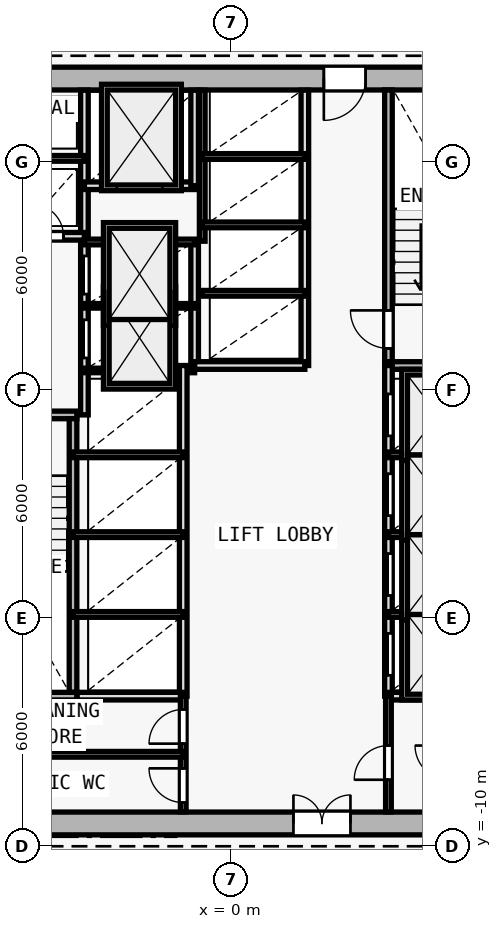
"""IFC4 building model, lengths in metres.
Left out: names, types, materials, properties, quantities, classifications, styles, units other than length and angle.
Written with IfcOpenShell. Run it as: python <this file> out.ifc"""

import sys

from ifc_helpers import new_model, si_unit, direction, frame, frame_2d, origin, origin_2d, place, context, subcontext, project, spatial, rectangle, i_section, extrude, element, fill, save


model = new_model("IFC4")
c1 = context("Model", 3, precision=1e-05, world=origin(), true_north=direction((0.0, 1.0)))
c2 = subcontext(c1, "Body", "Model", "MODEL_VIEW")
j1 = project(units=[si_unit("LENGTHUNIT", "METRE"), si_unit("PLANEANGLEUNIT", "RADIAN")], contexts=[c1])
p1 = place(None, origin())
s1 = spatial("IfcSite", under=j1, at=p1, CompositionType="ELEMENT")
p2 = place(p1, origin())
s2 = spatial("IfcBuilding", under=s1, at=p2, CompositionType="ELEMENT")
p3 = place(p2, frame((0.0, 0.0, 44.4)))
s3 = spatial("IfcBuildingStorey", under=s2, at=p3, CompositionType="ELEMENT", Elevation=44.4)
p4 = place(p3, frame((0.0, -9.4, 0.0), z_axis=(0.0, 0.0, 1.0), x_axis=(1.0, 0.0, 0.0)))
e1 = element("IfcColumn", 1, at=p4, inside=s3, PredefinedType="COLUMN", context=c2, shape_type="SweptSolid", body=[
    extrude(i_section(OverallWidth=0.416, OverallDepth=0.446, WebThickness=0.025, FlangeThickness=0.04, FilletRadius=0.015, at=origin_2d()), origin(), (0.0, 0.0, 1.0), 3.6),
])
p5 = place(p3, frame((-8.0, -9.4, 0.0), z_axis=(0.0, 0.0, 1.0), x_axis=(1.0, 0.0, 0.0)))
e2 = element("IfcWall", 2, at=p5, inside=s3, PredefinedType="SHEAR", context=c2, shape_type="SweptSolid", body=[
    extrude(rectangle(XDim=16.0, YDim=0.6, at=frame_2d((8.0, 0.0))), origin(), (0.0, 0.0, 1.0), 3.35),
])
p6 = place(p5, frame((9.65, 0.0, 0.0)))
e3 = element("IfcOpeningElement", 3, at=p6, cuts=e2, PredefinedType="OPENING", context=c2, shape_type="SweptSolid", body=[
    extrude(rectangle(XDim=1.5, YDim=2.2, at=frame_2d((0.75, 1.1))), frame((0.0, 0.31, 0.0), z_axis=(0.0, -1.0, 0.0), x_axis=(1.0, 0.0, 0.0)), (0.0, 0.0, 1.0), 0.62),
])
p7 = place(p3, frame((8.0, 10.2, 0.0), z_axis=(0.0, 0.0, 1.0), x_axis=(-1.0, 0.0, 0.0)))
e4 = element("IfcWall", 4, at=p7, inside=s3, PredefinedType="SHEAR", context=c2, shape_type="SweptSolid", body=[
    extrude(rectangle(XDim=16.0, YDim=0.6, at=frame_2d((8.0, 0.0))), origin(), (0.0, 0.0, 1.0), 3.35),
])
p8 = place(p7, frame((4.45, 0.0, 0.0)))
e5 = element("IfcOpeningElement", 5, at=p8, cuts=e4, PredefinedType="OPENING", context=c2, shape_type="SweptSolid", body=[
    extrude(rectangle(XDim=1.1, YDim=2.15, at=frame_2d((0.55, 1.075))), frame((0.0, 0.31, 0.0), z_axis=(0.0, -1.0, 0.0), x_axis=(1.0, 0.0, 0.0)), (0.0, 0.0, 1.0), 0.62),
])
p9 = place(p3, frame((-7.4, 1.35, 0.0), z_axis=(0.0, 0.0, 1.0), x_axis=(1.0, 0.0, 0.0)))
e6 = element("IfcWall", 6, at=p9, inside=s3, PredefinedType="SOLIDWALL", context=c2, shape_type="SweptSolid", body=[
    extrude(rectangle(XDim=3.35, YDim=0.2, at=frame_2d((1.675, 0.0))), origin(), (0.0, 0.0, 1.0), 3.35),
])
p10 = place(p9, frame((0.65, 0.0, 0.0)))
e7 = element("IfcOpeningElement", 7, at=p10, cuts=e6, PredefinedType="OPENING", context=c2, shape_type="SweptSolid", body=[
    extrude(rectangle(XDim=1.0, YDim=2.15, at=frame_2d((0.5, 1.075))), frame((0.0, 0.11, 0.0), z_axis=(0.0, -1.0, 0.0), x_axis=(1.0, 0.0, 0.0)), (0.0, 0.0, 1.0), 0.22),
])
p11 = place(p3, frame((-4.15, -5.95, 0.0), z_axis=(0.0, 0.0, 1.0), x_axis=(0.0, 1.0, 0.0)))
e8 = element("IfcWall", 8, at=p11, inside=s3, PredefinedType="SOLIDWALL", context=c2, shape_type="SweptSolid", body=[
    extrude(rectangle(XDim=7.2, YDim=0.2, at=frame_2d((3.6, 0.0))), origin(), (0.0, 0.0, 1.0), 3.35),
])
p12 = place(p3, frame((-3.85, 1.35, 0.0), z_axis=(0.0, 0.0, 1.0), x_axis=(0.0, 1.0, 0.0)))
e9 = element("IfcWall", 9, at=p12, inside=s3, PredefinedType="SOLIDWALL", context=c2, shape_type="SweptSolid", body=[
    extrude(rectangle(XDim=8.545, YDim=0.2, at=frame_2d((4.272, 0.0))), origin(), (0.0, 0.0, 1.0), 3.35),
])
p13 = place(p12, frame((1.5, 0.0, 0.0)))
e10 = element("IfcOpeningElement", 10, at=p13, cuts=e9, PredefinedType="OPENING", context=c2, shape_type="SweptSolid", body=[
    extrude(rectangle(XDim=1.0, YDim=2.15, at=frame_2d((0.5, 1.075))), frame((0.0, 0.11, 0.0), z_axis=(0.0, -1.0, 0.0), x_axis=(1.0, 0.0, 0.0)), (0.0, 0.0, 1.0), 0.22),
])
p14 = place(p12, frame((3.18, 0.0, 0.0)))
e11 = element("IfcOpeningElement", 11, at=p14, cuts=e9, PredefinedType="OPENING", context=c2, shape_type="SweptSolid", body=[
    extrude(rectangle(XDim=1.0, YDim=2.15, at=frame_2d((0.5, 1.075))), frame((0.0, 0.11, 0.0), z_axis=(0.0, -1.0, 0.0), x_axis=(1.0, 0.0, 0.0)), (0.0, 0.0, 1.0), 0.22),
])
p15 = place(p3, frame((-7.395, 6.05, 0.0), z_axis=(0.0, 0.0, 1.0), x_axis=(1.0, 0.0, 0.0)))
e12 = element("IfcWall", 12, at=p15, inside=s3, PredefinedType="SOLIDWALL", context=c2, shape_type="SweptSolid", body=[
    extrude(rectangle(XDim=3.545, YDim=0.2, at=frame_2d((1.772, 0.0))), origin(), (0.0, 0.0, 1.0), 3.35),
])
p16 = place(p15, frame((0.345, 0.0, 0.0)))
e13 = element("IfcOpeningElement", 13, at=p16, cuts=e12, PredefinedType="OPENING", context=c2, shape_type="SweptSolid", body=[
    extrude(rectangle(XDim=0.85, YDim=2.1, at=frame_2d((0.425, 1.05))), frame((0.0, 0.11, 0.0), z_axis=(0.0, -1.0, 0.0), x_axis=(1.0, 0.0, 0.0)), (0.0, 0.0, 1.0), 0.22),
])
p17 = place(p15, frame((2.145, 0.0, 0.0)))
e14 = element("IfcOpeningElement", 14, at=p17, cuts=e12, PredefinedType="OPENING", context=c2, shape_type="SweptSolid", body=[
    extrude(rectangle(XDim=0.85, YDim=2.1, at=frame_2d((0.425, 1.05))), frame((0.0, 0.11, 0.0), z_axis=(0.0, -1.0, 0.0), x_axis=(1.0, 0.0, 0.0)), (0.0, 0.0, 1.0), 0.22),
])
p18 = place(p3, frame((-7.395, 8.1, 0.0), z_axis=(0.0, 0.0, 1.0), x_axis=(1.0, 0.0, 0.0)))
e15 = element("IfcWall", 15, at=p18, inside=s3, PredefinedType="PARTITIONING", context=c2, shape_type="SweptSolid", body=[
    extrude(rectangle(XDim=3.545, YDim=0.15, at=frame_2d((1.772, 0.0))), origin(), (0.0, 0.0, 1.0), 3.35),
])
p19 = place(p3, frame((4.15, 2.75, 0.0), z_axis=(0.0, 0.0, 1.0), x_axis=(0.0, 1.0, 0.0)))
e16 = element("IfcWall", 16, at=p19, inside=s3, PredefinedType="SOLIDWALL", context=c2, shape_type="SweptSolid", body=[
    extrude(rectangle(XDim=7.15, YDim=0.2, at=frame_2d((3.575, 0.0))), origin(), (0.0, 0.0, 1.0), 3.35),
])
p20 = place(p19, frame((0.35, 0.0, 0.0)))
e17 = element("IfcOpeningElement", 17, at=p20, cuts=e16, PredefinedType="OPENING", context=c2, shape_type="SweptSolid", body=[
    extrude(rectangle(XDim=1.0, YDim=2.15, at=frame_2d((0.5, 1.075))), frame((0.0, 0.11, 0.0), z_axis=(0.0, -1.0, 0.0), x_axis=(1.0, 0.0, 0.0)), (0.0, 0.0, 1.0), 0.22),
])
p21 = place(p3, frame((4.05, 2.65, 0.0), z_axis=(0.0, 0.0, 1.0), x_axis=(1.0, 0.0, 0.0)))
e18 = element("IfcWall", 18, at=p21, inside=s3, PredefinedType="SOLIDWALL", context=c2, shape_type="SweptSolid", body=[
    extrude(rectangle(XDim=3.35, YDim=0.2, at=frame_2d((1.675, 0.0))), origin(), (0.0, 0.0, 1.0), 3.35),
])
p22 = place(p3, frame((-0.95, 2.65, 0.0), z_axis=(0.0, 0.0, 1.0), x_axis=(0.0, 1.0, 0.0)))
e19 = element("IfcWall", 19, at=p22, inside=s3, PredefinedType="SOLIDWALL", context=c2, shape_type="SweptSolid", body=[
    extrude(rectangle(XDim=3.27, YDim=0.2, at=frame_2d((1.635, 0.0))), origin(), (0.0, 0.0, 1.0), 3.35),
])
for number, where, z_axis, x_axis in (
    (20, (-3.85, 2.52, 0.0), (0.0, 0.0, 1.0), (1.0, 0.0, 0.0)),
    (21, (-3.85, 4.22, 0.0), (0.0, 0.0, 1.0), (1.0, 0.0, 0.0)),
):
    element("IfcWall", number, at=place(p3, frame(where, z_axis=z_axis, x_axis=x_axis)), inside=s3, PredefinedType="PARTITIONING", context=c2, shape_type="SweptSolid", body=[
        extrude(rectangle(XDim=2.9, YDim=0.12, at=frame_2d((1.45, 0.0))), origin(), (0.0, 0.0, 1.0), 3.35),
    ])
p23 = place(p3, frame((-3.85, 5.9, 0.0), z_axis=(0.0, 0.0, 1.0), x_axis=(1.0, 0.0, 0.0)))
e22 = element("IfcWall", 22, at=p23, inside=s3, PredefinedType="PARTITIONING", context=c2, shape_type="SweptSolid", body=[
    extrude(rectangle(XDim=2.9, YDim=0.15, at=frame_2d((1.45, 0.0))), origin(), (0.0, 0.0, 1.0), 3.35),
])
p24 = place(p3, frame((-3.85, 7.38, 0.0), z_axis=(0.0, 0.0, 1.0), x_axis=(1.0, 0.0, 0.0)))
e23 = element("IfcWall", 23, at=p24, inside=s3, PredefinedType="SOLIDWALL", context=c2, shape_type="SweptSolid", body=[
    extrude(rectangle(XDim=2.9, YDim=0.2, at=frame_2d((1.45, 0.0))), origin(), (0.0, 0.0, 1.0), 3.35),
])
p25 = place(p24, frame((0.85, 0.0, 0.0)))
e24 = element("IfcOpeningElement", 24, at=p25, cuts=e23, PredefinedType="OPENING", context=c2, shape_type="SweptSolid", body=[
    extrude(rectangle(XDim=1.2, YDim=2.2, at=frame_2d((0.6, 1.1))), frame((0.0, 0.11, 0.0), z_axis=(0.0, -1.0, 0.0), x_axis=(1.0, 0.0, 0.0)), (0.0, 0.0, 1.0), 0.22),
])
p26 = place(p3, frame((-0.95, 7.38, 0.0), z_axis=(0.0, 0.0, 1.0), x_axis=(0.0, 1.0, 0.0)))
e25 = element("IfcWall", 25, at=p26, inside=s3, PredefinedType="SOLIDWALL", context=c2, shape_type="SweptSolid", body=[
    extrude(rectangle(XDim=2.515, YDim=0.2, at=frame_2d((1.258, 0.0))), origin(), (0.0, 0.0, 1.0), 3.35),
])
p27 = place(p3, frame((4.15, -6.05, 0.0), z_axis=(0.0, 0.0, 1.0), x_axis=(0.0, 1.0, 0.0)))
e26 = element("IfcWall", 26, at=p27, inside=s3, PredefinedType="SOLIDWALL", context=c2, shape_type="SweptSolid", body=[
    extrude(rectangle(XDim=8.7, YDim=0.2, at=frame_2d((4.35, 0.0))), origin(), (0.0, 0.0, 1.0), 3.35),
])
p28 = place(p27, frame((0.55, 0.0, 0.0)))
e27 = element("IfcOpeningElement", 27, at=p28, cuts=e26, PredefinedType="OPENING", context=c2, shape_type="SweptSolid", body=[
    extrude(rectangle(XDim=1.1, YDim=2.15, at=frame_2d((0.55, 1.075))), frame((0.0, 0.11, 0.0), z_axis=(0.0, -1.0, 0.0), x_axis=(1.0, 0.0, 0.0)), (0.0, 0.0, 1.0), 0.22),
])
p29 = place(p27, frame((2.65, 0.0, 0.0)))
e28 = element("IfcOpeningElement", 28, at=p29, cuts=e26, PredefinedType="OPENING", context=c2, shape_type="SweptSolid", body=[
    extrude(rectangle(XDim=1.1, YDim=2.15, at=frame_2d((0.55, 1.075))), frame((0.0, 0.11, 0.0), z_axis=(0.0, -1.0, 0.0), x_axis=(1.0, 0.0, 0.0)), (0.0, 0.0, 1.0), 0.22),
])
p30 = place(p27, frame((4.75, 0.0, 0.0)))
e29 = element("IfcOpeningElement", 29, at=p30, cuts=e26, PredefinedType="OPENING", context=c2, shape_type="SweptSolid", body=[
    extrude(rectangle(XDim=1.1, YDim=2.15, at=frame_2d((0.55, 1.075))), frame((0.0, 0.11, 0.0), z_axis=(0.0, -1.0, 0.0), x_axis=(1.0, 0.0, 0.0)), (0.0, 0.0, 1.0), 0.22),
])
p31 = place(p27, frame((6.85, 0.0, 0.0)))
e30 = element("IfcOpeningElement", 30, at=p31, cuts=e26, PredefinedType="OPENING", context=c2, shape_type="SweptSolid", body=[
    extrude(rectangle(XDim=1.1, YDim=2.15, at=frame_2d((0.55, 1.075))), frame((0.0, 0.11, 0.0), z_axis=(0.0, -1.0, 0.0), x_axis=(1.0, 0.0, 0.0)), (0.0, 0.0, 1.0), 0.22),
])
for number, where, z_axis, x_axis in (
    (31, (4.15, -3.9, 0.0), (0.0, 0.0, 1.0), (1.0, 0.0, 0.0)),
    (32, (4.15, -1.8, 0.0), (0.0, 0.0, 1.0), (1.0, 0.0, 0.0)),
    (33, (4.15, 0.3, 0.0), (0.0, 0.0, 1.0), (1.0, 0.0, 0.0)),
):
    element("IfcWall", number, at=place(p3, frame(where, z_axis=z_axis, x_axis=x_axis)), inside=s3, PredefinedType="PARTITIONING", context=c2, shape_type="SweptSolid", body=[
        extrude(rectangle(XDim=2.6, YDim=0.15, at=frame_2d((1.3, 0.0))), origin(), (0.0, 0.0, 1.0), 3.35),
    ])
p32 = place(p3, frame((-1.25, -6.05, 0.0), z_axis=(0.0, 0.0, 1.0), x_axis=(0.0, 1.0, 0.0)))
e34 = element("IfcWall", 34, at=p32, inside=s3, PredefinedType="SOLIDWALL", context=c2, shape_type="SweptSolid", body=[
    extrude(rectangle(XDim=8.7, YDim=0.2, at=frame_2d((4.35, 0.0))), origin(), (0.0, 0.0, 1.0), 3.35),
])
for number, where, z_axis, x_axis in (
    (35, (-4.15, -3.9, 0.0), (0.0, 0.0, 1.0), (1.0, 0.0, 0.0)),
    (36, (-4.15, -1.8, 0.0), (0.0, 0.0, 1.0), (1.0, 0.0, 0.0)),
    (37, (-4.15, 0.3, 0.0), (0.0, 0.0, 1.0), (1.0, 0.0, 0.0)),
):
    element("IfcWall", number, at=place(p3, frame(where, z_axis=z_axis, x_axis=x_axis)), inside=s3, PredefinedType="PARTITIONING", context=c2, shape_type="SweptSolid", body=[
        extrude(rectangle(XDim=2.9, YDim=0.15, at=frame_2d((1.45, 0.0))), origin(), (0.0, 0.0, 1.0), 3.35),
    ])
p33 = place(p3, frame((1.95, 2.65, 0.0), z_axis=(0.0, 0.0, 1.0), x_axis=(0.0, 1.0, 0.0)))
e38 = element("IfcWall", 38, at=p33, inside=s3, PredefinedType="SOLIDWALL", context=c2, shape_type="SweptSolid", body=[
    extrude(rectangle(XDim=7.245, YDim=0.2, at=frame_2d((3.623, 0.0))), origin(), (0.0, 0.0, 1.0), 3.35),
])
p34 = place(p3, frame((-0.95, 2.65, 0.0), z_axis=(0.0, 0.0, 1.0), x_axis=(1.0, 0.0, 0.0)))
e39 = element("IfcWall", 39, at=p34, inside=s3, PredefinedType="SOLIDWALL", context=c2, shape_type="SweptSolid", body=[
    extrude(rectangle(XDim=2.9, YDim=0.2, at=frame_2d((1.45, 0.0))), origin(), (0.0, 0.0, 1.0), 3.35),
])
p35 = place(p3, frame((-0.75, 5.92, 0.0), z_axis=(0.0, 0.0, 1.0), x_axis=(0.0, 1.0, 0.0)))
e40 = element("IfcWall", 40, at=p35, inside=s3, PredefinedType="PARTITIONING", context=c2, shape_type="SweptSolid", body=[
    extrude(rectangle(XDim=3.975, YDim=0.15, at=frame_2d((1.988, 0.0))), origin(), (0.0, 0.0, 1.0), 3.35),
])
for number, where, z_axis, x_axis in (
    (41, (-0.75, 4.55, 0.0), (0.0, 0.0, 1.0), (1.0, 0.0, 0.0)),
    (42, (-0.75, 6.35, 0.0), (0.0, 0.0, 1.0), (1.0, 0.0, 0.0)),
    (43, (-0.75, 8.15, 0.0), (0.0, 0.0, 1.0), (1.0, 0.0, 0.0)),
):
    element("IfcWall", number, at=place(p3, frame(where, z_axis=z_axis, x_axis=x_axis)), inside=s3, PredefinedType="PARTITIONING", context=c2, shape_type="SweptSolid", body=[
        extrude(rectangle(XDim=2.7, YDim=0.15, at=frame_2d((1.35, 0.0))), origin(), (0.0, 0.0, 1.0), 3.35),
    ])
p36 = place(p3, frame((-7.4, -6.05, 0.0), z_axis=(0.0, 0.0, 1.0), x_axis=(1.0, 0.0, 0.0)))
e44 = element("IfcWall", 44, at=p36, inside=s3, PredefinedType="SOLIDWALL", context=c2, shape_type="SweptSolid", body=[
    extrude(rectangle(XDim=3.35, YDim=0.2, at=frame_2d((1.675, 0.0))), origin(), (0.0, 0.0, 1.0), 3.35),
])
p37 = place(p3, frame((-4.04, -6.05, 0.0), z_axis=(0.0, 0.0, 1.0), x_axis=(1.0, 0.0, 0.0)))
e45 = element("IfcWall", 45, at=p37, inside=s3, PredefinedType="SOLIDWALL", context=c2, shape_type="SweptSolid", body=[
    extrude(rectangle(XDim=2.79, YDim=0.2, at=frame_2d((1.395, 0.0))), origin(), (0.0, 0.0, 1.0), 3.35),
])
p38 = place(p3, frame((4.15, -6.05, 0.0), z_axis=(0.0, 0.0, 1.0), x_axis=(1.0, 0.0, 0.0)))
e46 = element("IfcWall", 46, at=p38, inside=s3, PredefinedType="SOLIDWALL", context=c2, shape_type="SweptSolid", body=[
    extrude(rectangle(XDim=3.245, YDim=0.2, at=frame_2d((1.623, 0.0))), origin(), (0.0, 0.0, 1.0), 3.35),
])
p39 = place(p3, frame((-1.25, -9.095, 0.0), z_axis=(0.0, 0.0, 1.0), x_axis=(0.0, 1.0, 0.0)))
e47 = element("IfcWall", 47, at=p39, inside=s3, PredefinedType="PARTITIONING", context=c2, shape_type="SweptSolid", body=[
    extrude(rectangle(XDim=3.045, YDim=0.15, at=frame_2d((1.522, 0.0))), origin(), (0.0, 0.0, 1.0), 3.35),
])
p40 = place(p39, frame((1.795, 0.0, 0.0)))
e48 = element("IfcOpeningElement", 48, at=p40, cuts=e47, PredefinedType="OPENING", context=c2, shape_type="SweptSolid", body=[
    extrude(rectangle(XDim=0.9, YDim=2.1, at=frame_2d((0.45, 1.05))), frame((0.0, 0.085, 0.0), z_axis=(0.0, -1.0, 0.0), x_axis=(1.0, 0.0, 0.0)), (0.0, 0.0, 1.0), 0.17),
])
p41 = place(p39, frame((0.245, 0.0, 0.0)))
e49 = element("IfcOpeningElement", 49, at=p41, cuts=e47, PredefinedType="OPENING", context=c2, shape_type="SweptSolid", body=[
    extrude(rectangle(XDim=0.9, YDim=2.1, at=frame_2d((0.45, 1.05))), frame((0.0, 0.085, 0.0), z_axis=(0.0, -1.0, 0.0), x_axis=(1.0, 0.0, 0.0)), (0.0, 0.0, 1.0), 0.17),
])
p42 = place(p3, frame((4.15, -9.095, 0.0), z_axis=(0.0, 0.0, 1.0), x_axis=(0.0, 1.0, 0.0)))
e50 = element("IfcWall", 50, at=p42, inside=s3, PredefinedType="PARTITIONING", context=c2, shape_type="SweptSolid", body=[
    extrude(rectangle(XDim=3.045, YDim=0.15, at=frame_2d((1.522, 0.0))), origin(), (0.0, 0.0, 1.0), 3.35),
])
p43 = place(p42, frame((0.845, 0.0, 0.0)))
e51 = element("IfcOpeningElement", 51, at=p43, cuts=e50, PredefinedType="OPENING", context=c2, shape_type="SweptSolid", body=[
    extrude(rectangle(XDim=0.9, YDim=2.1, at=frame_2d((0.45, 1.05))), frame((0.0, 0.085, 0.0), z_axis=(0.0, -1.0, 0.0), x_axis=(1.0, 0.0, 0.0)), (0.0, 0.0, 1.0), 0.17),
])
p44 = place(p3, frame((-7.395, -7.58, 0.0), z_axis=(0.0, 0.0, 1.0), x_axis=(1.0, 0.0, 0.0)))
e52 = element("IfcWall", 52, at=p44, inside=s3, PredefinedType="PARTITIONING", context=c2, shape_type="SweptSolid", body=[
    extrude(rectangle(XDim=6.145, YDim=0.15, at=frame_2d((3.073, 0.0))), origin(), (0.0, 0.0, 1.0), 3.35),
])
p45 = place(p6, origin())
e53 = element("IfcDoor", 53, at=p45, inside=s3, OperationType="DOUBLE_DOOR_SINGLE_SWING", PredefinedType="DOOR", context=c2, shape_type="SweptSolid", body=[
    extrude(rectangle(XDim=1.5, YDim=2.2, at=frame_2d((0.75, 1.1))), frame((0.0, 0.025, 0.0), z_axis=(0.0, -1.0, 0.0), x_axis=(1.0, 0.0, 0.0)), (0.0, 0.0, 1.0), 0.05),
])
fill(e3, e53)
p46 = place(p8, origin())
e54 = element("IfcDoor", 54, at=p46, inside=s3, OperationType="SINGLE_SWING_RIGHT", PredefinedType="DOOR", context=c2, shape_type="SweptSolid", body=[
    extrude(rectangle(XDim=1.1, YDim=2.15, at=frame_2d((0.55, 1.075))), frame((0.0, 0.025, 0.0), z_axis=(0.0, -1.0, 0.0), x_axis=(1.0, 0.0, 0.0)), (0.0, 0.0, 1.0), 0.05),
])
fill(e5, e54)
p47 = place(p17, origin())
e55 = element("IfcDoor", 55, at=p47, inside=s3, OperationType="SINGLE_SWING_LEFT", PredefinedType="DOOR", context=c2, shape_type="SweptSolid", body=[
    extrude(rectangle(XDim=0.85, YDim=2.1, at=frame_2d((0.425, 1.05))), frame((0.0, 0.025, 0.0), z_axis=(0.0, -1.0, 0.0), x_axis=(1.0, 0.0, 0.0)), (0.0, 0.0, 1.0), 0.05),
])
fill(e14, e55)
p48 = place(p20, origin())
e56 = element("IfcDoor", 56, at=p48, inside=s3, OperationType="SINGLE_SWING_RIGHT", PredefinedType="DOOR", context=c2, shape_type="SweptSolid", body=[
    extrude(rectangle(XDim=1.0, YDim=2.15, at=frame_2d((0.5, 1.075))), frame((0.0, 0.025, 0.0), z_axis=(0.0, -1.0, 0.0), x_axis=(1.0, 0.0, 0.0)), (0.0, 0.0, 1.0), 0.05),
])
fill(e17, e56)
p49 = place(p25, origin())
e57 = element("IfcDoor", 57, at=p49, inside=s3, OperationType="DOUBLE_DOOR_SLIDING", PredefinedType="DOOR", context=c2, shape_type="SweptSolid", body=[
    extrude(rectangle(XDim=1.2, YDim=2.2, at=frame_2d((0.6, 1.1))), frame((0.0, 0.025, 0.0), z_axis=(0.0, -1.0, 0.0), x_axis=(1.0, 0.0, 0.0)), (0.0, 0.0, 1.0), 0.05),
])
fill(e24, e57)
p50 = place(p28, origin())
e58 = element("IfcDoor", 58, at=p50, inside=s3, OperationType="DOUBLE_DOOR_SLIDING", PredefinedType="DOOR", context=c2, shape_type="SweptSolid", body=[
    extrude(rectangle(XDim=1.1, YDim=2.15, at=frame_2d((0.55, 1.075))), frame((0.0, 0.025, 0.0), z_axis=(0.0, -1.0, 0.0), x_axis=(1.0, 0.0, 0.0)), (0.0, 0.0, 1.0), 0.05),
])
fill(e27, e58)
p51 = place(p29, origin())
e59 = element("IfcDoor", 59, at=p51, inside=s3, OperationType="DOUBLE_DOOR_SLIDING", PredefinedType="DOOR", context=c2, shape_type="SweptSolid", body=[
    extrude(rectangle(XDim=1.1, YDim=2.15, at=frame_2d((0.55, 1.075))), frame((0.0, 0.025, 0.0), z_axis=(0.0, -1.0, 0.0), x_axis=(1.0, 0.0, 0.0)), (0.0, 0.0, 1.0), 0.05),
])
fill(e28, e59)
p52 = place(p30, origin())
e60 = element("IfcDoor", 60, at=p52, inside=s3, OperationType="DOUBLE_DOOR_SLIDING", PredefinedType="DOOR", context=c2, shape_type="SweptSolid", body=[
    extrude(rectangle(XDim=1.1, YDim=2.15, at=frame_2d((0.55, 1.075))), frame((0.0, 0.025, 0.0), z_axis=(0.0, -1.0, 0.0), x_axis=(1.0, 0.0, 0.0)), (0.0, 0.0, 1.0), 0.05),
])
fill(e29, e60)
p53 = place(p31, origin())
e61 = element("IfcDoor", 61, at=p53, inside=s3, OperationType="DOUBLE_DOOR_SLIDING", PredefinedType="DOOR", context=c2, shape_type="SweptSolid", body=[
    extrude(rectangle(XDim=1.1, YDim=2.15, at=frame_2d((0.55, 1.075))), frame((0.0, 0.025, 0.0), z_axis=(0.0, -1.0, 0.0), x_axis=(1.0, 0.0, 0.0)), (0.0, 0.0, 1.0), 0.05),
])
fill(e30, e61)
p54 = place(p13, origin())
e62 = element("IfcDoor", 62, at=p54, inside=s3, OperationType="DOUBLE_DOOR_SLIDING", PredefinedType="DOOR", context=c2, shape_type="SweptSolid", body=[
    extrude(rectangle(XDim=1.0, YDim=2.15, at=frame_2d((0.5, 1.075))), frame((0.0, 0.025, 0.0), z_axis=(0.0, -1.0, 0.0), x_axis=(1.0, 0.0, 0.0)), (0.0, 0.0, 1.0), 0.05),
])
fill(e10, e62)
p55 = place(p14, origin())
e63 = element("IfcDoor", 63, at=p55, inside=s3, OperationType="DOUBLE_DOOR_SLIDING", PredefinedType="DOOR", context=c2, shape_type="SweptSolid", body=[
    extrude(rectangle(XDim=1.0, YDim=2.15, at=frame_2d((0.5, 1.075))), frame((0.0, 0.025, 0.0), z_axis=(0.0, -1.0, 0.0), x_axis=(1.0, 0.0, 0.0)), (0.0, 0.0, 1.0), 0.05),
])
fill(e11, e63)
p56 = place(p40, origin())
e64 = element("IfcDoor", 64, at=p56, inside=s3, OperationType="SINGLE_SWING_LEFT", PredefinedType="DOOR", context=c2, shape_type="SweptSolid", body=[
    extrude(rectangle(XDim=0.9, YDim=2.1, at=frame_2d((0.45, 1.05))), frame((0.0, 0.025, 0.0), z_axis=(0.0, -1.0, 0.0), x_axis=(1.0, 0.0, 0.0)), (0.0, 0.0, 1.0), 0.05),
])
fill(e48, e64)
p57 = place(p41, origin())
e65 = element("IfcDoor", 65, at=p57, inside=s3, OperationType="SINGLE_SWING_RIGHT", PredefinedType="DOOR", context=c2, shape_type="SweptSolid", body=[
    extrude(rectangle(XDim=0.9, YDim=2.1, at=frame_2d((0.45, 1.05))), frame((0.0, 0.025, 0.0), z_axis=(0.0, -1.0, 0.0), x_axis=(1.0, 0.0, 0.0)), (0.0, 0.0, 1.0), 0.05),
])
fill(e49, e65)
p58 = place(p43, origin())
e66 = element("IfcDoor", 66, at=p58, inside=s3, OperationType="SINGLE_SWING_LEFT", PredefinedType="DOOR", context=c2, shape_type="SweptSolid", body=[
    extrude(rectangle(XDim=0.9, YDim=2.1, at=frame_2d((0.45, 1.05))), frame((0.0, 0.025, 0.0), z_axis=(0.0, -1.0, 0.0), x_axis=(1.0, 0.0, 0.0)), (0.0, 0.0, 1.0), 0.05),
])
fill(e51, e66)
save(model, sys.argv[1])
